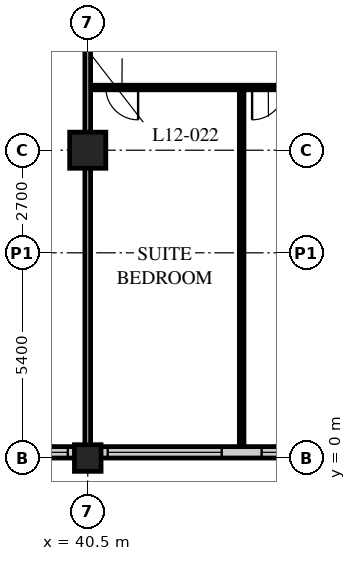
"""IFC4 building model, lengths in metres.
Left out: names, types, materials, properties, quantities, classifications, styles, units other than length and angle.
Written with IfcOpenShell. Run it as: python <this file> out.ifc"""

import sys

from ifc_helpers import new_model, si_unit, direction, frame, frame_2d, origin, origin_2d, place, context, subcontext, project, spatial, rectangle, hollow_rectangle, extrude, element, fill, save


model = new_model("IFC4")
c1 = context("Model", 3, precision=1e-05, world=origin(), true_north=direction((0.0, 1.0)))
c2 = subcontext(c1, "Body", "Model", "MODEL_VIEW")
j1 = project(units=[si_unit("LENGTHUNIT", "METRE"), si_unit("PLANEANGLEUNIT", "RADIAN")], contexts=[c1])
p1 = place(None, origin())
s1 = spatial("IfcSite", under=j1, at=p1, CompositionType="ELEMENT")
p2 = place(p1, origin())
s2 = spatial("IfcBuilding", under=s1, at=p2, CompositionType="ELEMENT")
p3 = place(p2, frame((0.0, 0.0, 53.4)))
s3 = spatial("IfcBuildingStorey", under=s2, at=p3, CompositionType="ELEMENT", Elevation=53.4)
p4 = place(p3, frame((40.5, 0.0, 0.0), z_axis=(0.0, 0.0, 1.0), x_axis=(1.0, 0.0, 0.0)))
e1 = element("IfcColumn", 1, at=p4, inside=s3, PredefinedType="COLUMN", context=c2, shape_type="SweptSolid", body=[
    extrude(hollow_rectangle(XDim=0.7, YDim=0.7, WallThickness=0.06, at=origin_2d()), origin(), (0.0, 0.0, 1.0), 3.4),
])
p5 = place(p3, frame((40.5, 8.1, 0.0), z_axis=(0.0, 0.0, 1.0), x_axis=(1.0, 0.0, 0.0)))
e2 = element("IfcColumn", 2, at=p5, inside=s3, PredefinedType="COLUMN", context=c2, shape_type="SweptSolid", body=[
    extrude(hollow_rectangle(XDim=0.95, YDim=0.95, WallThickness=0.095, at=origin_2d()), origin(), (0.0, 0.0, 1.0), 3.4),
])
p6 = place(p3, frame((8.4, 0.15, 0.0), z_axis=(0.0, 0.0, 1.0), x_axis=(1.0, 0.0, 0.0)))
e3 = element("IfcWall", 3, at=p6, inside=s3, PredefinedType="SOLIDWALL", context=c2, shape_type="SweptSolid", body=[
    extrude(rectangle(XDim=40.2, YDim=0.3, at=frame_2d((20.1, 0.0))), origin(), (0.0, 0.0, 1.0), 3.19),
])
p7 = place(p6, frame((0.225, 0.0, 0.9)))
e4 = element("IfcOpeningElement", 4, at=p7, cuts=e3, PredefinedType="OPENING", context=c2, shape_type="SweptSolid", body=[
    extrude(rectangle(XDim=3.0, YDim=2.0, at=frame_2d((1.5, 1.0))), frame((0.0, 0.16, 0.0), z_axis=(0.0, -1.0, 0.0), x_axis=(1.0, 0.0, 0.0)), (0.0, 0.0, 1.0), 0.32),
])
p8 = place(p6, frame((4.275, 0.0, 0.9)))
e5 = element("IfcOpeningElement", 5, at=p8, cuts=e3, PredefinedType="OPENING", context=c2, shape_type="SweptSolid", body=[
    extrude(rectangle(XDim=3.0, YDim=2.0, at=frame_2d((1.5, 1.0))), frame((0.0, 0.16, 0.0), z_axis=(0.0, -1.0, 0.0), x_axis=(1.0, 0.0, 0.0)), (0.0, 0.0, 1.0), 0.32),
])
p9 = place(p6, frame((8.325, 0.0, 0.9)))
e6 = element("IfcOpeningElement", 6, at=p9, cuts=e3, PredefinedType="OPENING", context=c2, shape_type="SweptSolid", body=[
    extrude(rectangle(XDim=3.0, YDim=2.0, at=frame_2d((1.5, 1.0))), frame((0.0, 0.16, 0.0), z_axis=(0.0, -1.0, 0.0), x_axis=(1.0, 0.0, 0.0)), (0.0, 0.0, 1.0), 0.32),
])
p10 = place(p6, frame((12.375, 0.0, 0.9)))
e7 = element("IfcOpeningElement", 7, at=p10, cuts=e3, PredefinedType="OPENING", context=c2, shape_type="SweptSolid", body=[
    extrude(rectangle(XDim=3.0, YDim=2.0, at=frame_2d((1.5, 1.0))), frame((0.0, 0.16, 0.0), z_axis=(0.0, -1.0, 0.0), x_axis=(1.0, 0.0, 0.0)), (0.0, 0.0, 1.0), 0.32),
])
p11 = place(p6, frame((16.425, 0.0, 0.9)))
e8 = element("IfcOpeningElement", 8, at=p11, cuts=e3, PredefinedType="OPENING", context=c2, shape_type="SweptSolid", body=[
    extrude(rectangle(XDim=3.0, YDim=2.0, at=frame_2d((1.5, 1.0))), frame((0.0, 0.16, 0.0), z_axis=(0.0, -1.0, 0.0), x_axis=(1.0, 0.0, 0.0)), (0.0, 0.0, 1.0), 0.32),
])
p12 = place(p6, frame((20.475, 0.0, 0.9)))
e9 = element("IfcOpeningElement", 9, at=p12, cuts=e3, PredefinedType="OPENING", context=c2, shape_type="SweptSolid", body=[
    extrude(rectangle(XDim=3.0, YDim=2.0, at=frame_2d((1.5, 1.0))), frame((0.0, 0.16, 0.0), z_axis=(0.0, -1.0, 0.0), x_axis=(1.0, 0.0, 0.0)), (0.0, 0.0, 1.0), 0.32),
])
p13 = place(p6, frame((24.525, 0.0, 0.9)))
e10 = element("IfcOpeningElement", 10, at=p13, cuts=e3, PredefinedType="OPENING", context=c2, shape_type="SweptSolid", body=[
    extrude(rectangle(XDim=3.0, YDim=2.0, at=frame_2d((1.5, 1.0))), frame((0.0, 0.16, 0.0), z_axis=(0.0, -1.0, 0.0), x_axis=(1.0, 0.0, 0.0)), (0.0, 0.0, 1.0), 0.32),
])
p14 = place(p6, frame((28.575, 0.0, 0.9)))
e11 = element("IfcOpeningElement", 11, at=p14, cuts=e3, PredefinedType="OPENING", context=c2, shape_type="SweptSolid", body=[
    extrude(rectangle(XDim=3.0, YDim=2.0, at=frame_2d((1.5, 1.0))), frame((0.0, 0.16, 0.0), z_axis=(0.0, -1.0, 0.0), x_axis=(1.0, 0.0, 0.0)), (0.0, 0.0, 1.0), 0.32),
])
p15 = place(p6, frame((32.625, 0.0, 0.9)))
e12 = element("IfcOpeningElement", 12, at=p15, cuts=e3, PredefinedType="OPENING", context=c2, shape_type="SweptSolid", body=[
    extrude(rectangle(XDim=3.0, YDim=2.0, at=frame_2d((1.5, 1.0))), frame((0.0, 0.16, 0.0), z_axis=(0.0, -1.0, 0.0), x_axis=(1.0, 0.0, 0.0)), (0.0, 0.0, 1.0), 0.32),
])
p16 = place(p6, frame((36.675, 0.0, 0.9)))
e13 = element("IfcOpeningElement", 13, at=p16, cuts=e3, PredefinedType="OPENING", context=c2, shape_type="SweptSolid", body=[
    extrude(rectangle(XDim=3.0, YDim=2.0, at=frame_2d((1.5, 1.0))), frame((0.0, 0.16, 0.0), z_axis=(0.0, -1.0, 0.0), x_axis=(1.0, 0.0, 0.0)), (0.0, 0.0, 1.0), 0.32),
])
p17 = place(p3, frame((40.5, 9.75, 0.0), z_axis=(0.0, 0.0, 1.0), x_axis=(1.0, 0.0, 0.0)))
e14 = element("IfcWall", 14, at=p17, inside=s3, PredefinedType="PARTITIONING", context=c2, shape_type="SweptSolid", body=[
    extrude(rectangle(XDim=8.05, YDim=0.12, at=frame_2d((4.025, 0.0))), origin(), (0.0, 0.0, 1.0), 3.19),
])
p18 = place(p17, frame((0.475, 0.0, 0.0)))
e15 = element("IfcOpeningElement", 15, at=p18, cuts=e14, PredefinedType="OPENING", context=c2, shape_type="SweptSolid", body=[
    extrude(rectangle(XDim=0.85, YDim=2.1, at=frame_2d((0.425, 1.05))), frame((0.0, 0.07, 0.0), z_axis=(0.0, -1.0, 0.0), x_axis=(1.0, 0.0, 0.0)), (0.0, 0.0, 1.0), 0.14),
])
p19 = place(p17, frame((4.325, 0.0, 0.0)))
e16 = element("IfcOpeningElement", 16, at=p19, cuts=e14, PredefinedType="OPENING", context=c2, shape_type="SweptSolid", body=[
    extrude(rectangle(XDim=0.85, YDim=2.1, at=frame_2d((0.425, 1.05))), frame((0.0, 0.07, 0.0), z_axis=(0.0, -1.0, 0.0), x_axis=(1.0, 0.0, 0.0)), (0.0, 0.0, 1.0), 0.14),
])
p20 = place(p3, frame((44.55, 9.75, 0.0), z_axis=(0.0, 0.0, 1.0), x_axis=(0.0, -1.0, 0.0)))
e17 = element("IfcWall", 17, at=p20, inside=s3, PredefinedType="PARTITIONING", context=c2, shape_type="SweptSolid", body=[
    extrude(rectangle(XDim=9.45, YDim=0.12, at=frame_2d((4.725, 0.0))), origin(), (0.0, 0.0, 1.0), 3.19),
])
p21 = place(p3, frame((40.5, 12.15, 0.0), z_axis=(0.0, 0.0, 1.0), x_axis=(0.0, -1.0, 0.0)))
e18 = element("IfcWall", 18, at=p21, inside=s3, PredefinedType="PARTITIONING", context=c2, shape_type="SweptSolid", body=[
    extrude(rectangle(XDim=11.85, YDim=0.15, at=frame_2d((5.925, 0.0))), origin(), (0.0, 0.0, 1.0), 2.578),
])
p22 = place(p14, origin())
e19 = element("IfcWindow", 19, at=p22, inside=s3, PartitioningType="SINGLE_PANEL", PredefinedType="WINDOW", context=c2, shape_type="SweptSolid", body=[
    extrude(rectangle(XDim=3.0, YDim=2.0, at=frame_2d((1.5, 1.0))), frame((0.0, 0.03, 0.0), z_axis=(0.0, -1.0, 0.0), x_axis=(1.0, 0.0, 0.0)), (0.0, 0.0, 1.0), 0.06),
])
fill(e11, e19)
p23 = place(p15, origin())
e20 = element("IfcWindow", 20, at=p23, inside=s3, PartitioningType="SINGLE_PANEL", PredefinedType="WINDOW", context=c2, shape_type="SweptSolid", body=[
    extrude(rectangle(XDim=3.0, YDim=2.0, at=frame_2d((1.5, 1.0))), frame((0.0, 0.03, 0.0), z_axis=(0.0, -1.0, 0.0), x_axis=(1.0, 0.0, 0.0)), (0.0, 0.0, 1.0), 0.06),
])
fill(e12, e20)
p24 = place(p16, origin())
e21 = element("IfcWindow", 21, at=p24, inside=s3, PartitioningType="SINGLE_PANEL", PredefinedType="WINDOW", context=c2, shape_type="SweptSolid", body=[
    extrude(rectangle(XDim=3.0, YDim=2.0, at=frame_2d((1.5, 1.0))), frame((0.0, 0.03, 0.0), z_axis=(0.0, -1.0, 0.0), x_axis=(1.0, 0.0, 0.0)), (0.0, 0.0, 1.0), 0.06),
])
fill(e13, e21)
p25 = place(p18, origin())
e22 = element("IfcDoor", 22, at=p25, inside=s3, OperationType="SINGLE_SWING_LEFT", PredefinedType="DOOR", context=c2, shape_type="SweptSolid", body=[
    extrude(rectangle(XDim=0.85, YDim=2.1, at=frame_2d((0.425, 1.05))), frame((0.0, 0.025, 0.0), z_axis=(0.0, -1.0, 0.0), x_axis=(1.0, 0.0, 0.0)), (0.0, 0.0, 1.0), 0.05),
])
fill(e15, e22)
p26 = place(p19, origin())
e23 = element("IfcDoor", 23, at=p26, inside=s3, OperationType="SINGLE_SWING_RIGHT", PredefinedType="DOOR", context=c2, shape_type="SweptSolid", body=[
    extrude(rectangle(XDim=0.85, YDim=2.1, at=frame_2d((0.425, 1.05))), frame((0.0, 0.025, 0.0), z_axis=(0.0, -1.0, 0.0), x_axis=(1.0, 0.0, 0.0)), (0.0, 0.0, 1.0), 0.05),
])
fill(e16, e23)
save(model, sys.argv[1])
